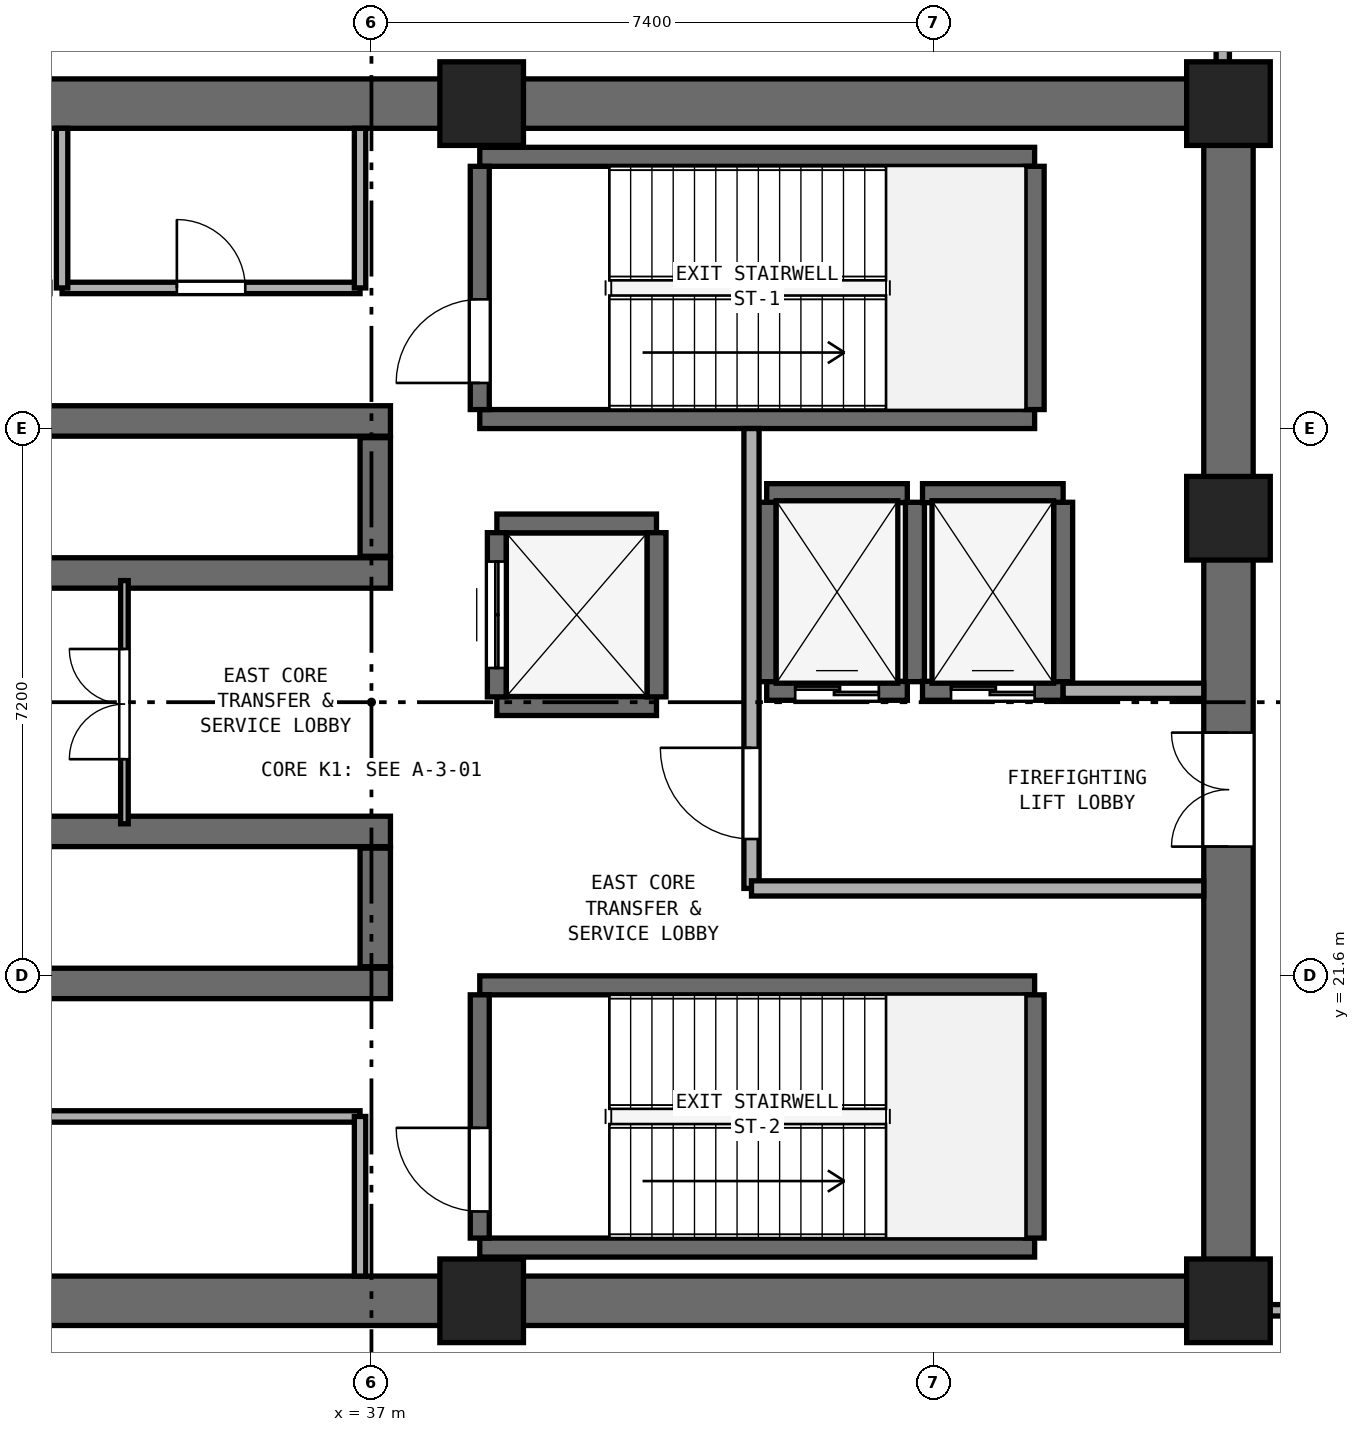
"""IFC4 building model, lengths in metres.
Left out: names, types, materials, properties, quantities, classifications, styles, units other than length and angle.
Written with IfcOpenShell. Run it as: python <this file> out.ifc"""

import sys

from ifc_helpers import new_model, si_unit, direction, frame, frame_2d, origin, origin_2d, place, context, subcontext, project, spatial, rectangle, extrude, element, fill, save


model = new_model("IFC4")
c1 = context("Model", 3, precision=1e-05, world=origin(), true_north=direction((0.0, 1.0)))
c2 = subcontext(c1, "Body", "Model", "MODEL_VIEW")
j1 = project(units=[si_unit("LENGTHUNIT", "METRE"), si_unit("PLANEANGLEUNIT", "RADIAN")], contexts=[c1])
p1 = place(None, origin())
s1 = spatial("IfcSite", under=j1, at=p1, CompositionType="ELEMENT")
p2 = place(p1, origin())
s2 = spatial("IfcBuilding", under=s1, at=p2, CompositionType="ELEMENT")
p3 = place(p2, frame((0.0, 0.0, -4.8)))
s3 = spatial("IfcBuildingStorey", under=s2, at=p3, CompositionType="ELEMENT", Elevation=-4.8)
for number, where, z_axis, x_axis in (
    (1, (25.4, 17.325, 0.0), (0.0, 0.0, 1.0), (1.0, 0.0, 0.0)),
    (2, (25.4, 33.075, 0.0), (0.0, 0.0, 1.0), (1.0, 0.0, 0.0)),
):
    element("IfcWall", number, at=place(p3, frame(where, z_axis=z_axis, x_axis=x_axis)), inside=s3, PredefinedType="SHEAR", context=c2, shape_type="SweptSolid", body=[
        extrude(rectangle(XDim=23.2, YDim=0.65, at=frame_2d((11.6, 0.0))), origin(), (0.0, 0.0, 1.0), 4.45),
    ])
p4 = place(p3, frame((48.275, 17.65, 0.0), z_axis=(0.0, 0.0, 1.0), x_axis=(0.0, 1.0, 0.0)))
e3 = element("IfcWall", 3, at=p4, inside=s3, PredefinedType="SHEAR", context=c2, shape_type="SweptSolid", body=[
    extrude(rectangle(XDim=15.1, YDim=0.65, at=frame_2d((7.55, 0.0))), origin(), (0.0, 0.0, 1.0), 4.45),
])
p5 = place(p4, frame((5.65, 0.0, 0.0)))
e4 = element("IfcOpeningElement", 4, at=p5, cuts=e3, PredefinedType="OPENING", context=c2, shape_type="SweptSolid", body=[
    extrude(rectangle(XDim=1.5, YDim=2.15, at=frame_2d((0.75, 1.075))), frame((0.0, 0.335, 0.0), z_axis=(0.0, -1.0, 0.0), x_axis=(1.0, 0.0, 0.0)), (0.0, 0.0, 1.0), 0.67),
])
for number, where, z_axis, x_axis in (
    (5, (38.45, 17.325, 0.0), (0.0, 0.0, 1.0), (1.0, 0.0, 0.0)),
    (6, (48.275, 17.325, 0.0), (0.0, 0.0, 1.0), (1.0, 0.0, 0.0)),
    (7, (48.275, 27.62, 0.0), (0.0, 0.0, 1.0), (1.0, 0.0, 0.0)),
    (8, (48.275, 33.075, 0.0), (0.0, 0.0, 1.0), (1.0, 0.0, 0.0)),
    (9, (38.45, 33.075, 0.0), (0.0, 0.0, 1.0), (1.0, 0.0, 0.0)),
):
    element("IfcColumn", number, at=place(p3, frame(where, z_axis=z_axis, x_axis=x_axis)), inside=s3, PredefinedType="PILASTER", context=c2, shape_type="SweptSolid", body=[
        extrude(rectangle(XDim=1.1, YDim=1.1, at=origin_2d()), origin(), (0.0, 0.0, 1.0), 4.8),
    ])
for number, where, z_axis, x_axis in (
    (10, (29.85, 21.5, 0.0), (0.0, 0.0, 1.0), (1.0, 0.0, 0.0)),
    (11, (29.85, 23.5, 0.0), (0.0, 0.0, 1.0), (1.0, 0.0, 0.0)),
):
    element("IfcWall", number, at=place(p3, frame(where, z_axis=z_axis, x_axis=x_axis)), inside=s3, PredefinedType="SOLIDWALL", context=c2, shape_type="SweptSolid", body=[
        extrude(rectangle(XDim=7.4, YDim=0.4, at=frame_2d((3.7, 0.0))), origin(), (0.0, 0.0, 1.0), 4.4),
    ])
p6 = place(p3, frame((37.05, 21.72, 0.0), z_axis=(0.0, 0.0, 1.0), x_axis=(0.0, 1.0, 0.0)))
e12 = element("IfcWall", 12, at=p6, inside=s3, PredefinedType="SOLIDWALL", context=c2, shape_type="SweptSolid", body=[
    extrude(rectangle(XDim=1.56, YDim=0.4, at=frame_2d((0.78, 0.0))), origin(), (0.0, 0.0, 1.0), 4.4),
])
for number, where, z_axis, x_axis in (
    (13, (29.85, 26.9, 0.0), (0.0, 0.0, 1.0), (1.0, 0.0, 0.0)),
    (14, (29.85, 28.9, 0.0), (0.0, 0.0, 1.0), (1.0, 0.0, 0.0)),
):
    element("IfcWall", number, at=place(p3, frame(where, z_axis=z_axis, x_axis=x_axis)), inside=s3, PredefinedType="SOLIDWALL", context=c2, shape_type="SweptSolid", body=[
        extrude(rectangle(XDim=7.4, YDim=0.4, at=frame_2d((3.7, 0.0))), origin(), (0.0, 0.0, 1.0), 4.4),
    ])
p7 = place(p3, frame((37.05, 27.12, 0.0), z_axis=(0.0, 0.0, 1.0), x_axis=(0.0, 1.0, 0.0)))
e15 = element("IfcWall", 15, at=p7, inside=s3, PredefinedType="SOLIDWALL", context=c2, shape_type="SweptSolid", body=[
    extrude(rectangle(XDim=1.56, YDim=0.4, at=frame_2d((0.78, 0.0))), origin(), (0.0, 0.0, 1.0), 4.4),
])
for number, where, z_axis, x_axis in (
    (16, (38.425, 28.925, 0.0), (0.0, 0.0, 1.0), (1.0, 0.0, 0.0)),
    (17, (38.425, 32.375, 0.0), (0.0, 0.0, 1.0), (1.0, 0.0, 0.0)),
):
    element("IfcWall", number, at=place(p3, frame(where, z_axis=z_axis, x_axis=x_axis)), inside=s3, PredefinedType="SHEAR", context=c2, shape_type="SweptSolid", body=[
        extrude(rectangle(XDim=7.3, YDim=0.25, at=frame_2d((3.65, 0.0))), origin(), (0.0, 0.0, 1.0), 4.45),
    ])
p8 = place(p3, frame((38.425, 29.05, 0.0), z_axis=(0.0, 0.0, 1.0), x_axis=(0.0, 1.0, 0.0)))
e18 = element("IfcWall", 18, at=p8, inside=s3, PredefinedType="SHEAR", context=c2, shape_type="SweptSolid", body=[
    extrude(rectangle(XDim=3.2, YDim=0.25, at=frame_2d((1.6, 0.0))), origin(), (0.0, 0.0, 1.0), 4.45),
])
p9 = place(p8, frame((0.35, 0.0, 0.0)))
e19 = element("IfcOpeningElement", 19, at=p9, cuts=e18, PredefinedType="OPENING", context=c2, shape_type="SweptSolid", body=[
    extrude(rectangle(XDim=1.1, YDim=2.15, at=frame_2d((0.55, 1.075))), frame((0.0, 0.135, 0.0), z_axis=(0.0, -1.0, 0.0), x_axis=(1.0, 0.0, 0.0)), (0.0, 0.0, 1.0), 0.27),
])
p10 = place(p3, frame((45.725, 29.05, 0.0), z_axis=(0.0, 0.0, 1.0), x_axis=(0.0, 1.0, 0.0)))
e20 = element("IfcWall", 20, at=p10, inside=s3, PredefinedType="SHEAR", context=c2, shape_type="SweptSolid", body=[
    extrude(rectangle(XDim=3.2, YDim=0.25, at=frame_2d((1.6, 0.0))), origin(), (0.0, 0.0, 1.0), 4.45),
])
for number, where, z_axis, x_axis in (
    (21, (38.425, 18.025, 0.0), (0.0, 0.0, 1.0), (1.0, 0.0, 0.0)),
    (22, (38.425, 21.475, 0.0), (0.0, 0.0, 1.0), (1.0, 0.0, 0.0)),
):
    element("IfcWall", number, at=place(p3, frame(where, z_axis=z_axis, x_axis=x_axis)), inside=s3, PredefinedType="SHEAR", context=c2, shape_type="SweptSolid", body=[
        extrude(rectangle(XDim=7.3, YDim=0.25, at=frame_2d((3.65, 0.0))), origin(), (0.0, 0.0, 1.0), 4.45),
    ])
p11 = place(p3, frame((38.425, 18.15, 0.0), z_axis=(0.0, 0.0, 1.0), x_axis=(0.0, 1.0, 0.0)))
e23 = element("IfcWall", 23, at=p11, inside=s3, PredefinedType="SHEAR", context=c2, shape_type="SweptSolid", body=[
    extrude(rectangle(XDim=3.2, YDim=0.25, at=frame_2d((1.6, 0.0))), origin(), (0.0, 0.0, 1.0), 4.45),
])
p12 = place(p11, frame((0.35, 0.0, 0.0)))
e24 = element("IfcOpeningElement", 24, at=p12, cuts=e23, PredefinedType="OPENING", context=c2, shape_type="SweptSolid", body=[
    extrude(rectangle(XDim=1.1, YDim=2.15, at=frame_2d((0.55, 1.075))), frame((0.0, 0.135, 0.0), z_axis=(0.0, -1.0, 0.0), x_axis=(1.0, 0.0, 0.0)), (0.0, 0.0, 1.0), 0.27),
])
p13 = place(p3, frame((45.725, 18.15, 0.0), z_axis=(0.0, 0.0, 1.0), x_axis=(0.0, 1.0, 0.0)))
e25 = element("IfcWall", 25, at=p13, inside=s3, PredefinedType="SHEAR", context=c2, shape_type="SweptSolid", body=[
    extrude(rectangle(XDim=3.2, YDim=0.25, at=frame_2d((1.6, 0.0))), origin(), (0.0, 0.0, 1.0), 4.45),
])
p14 = place(p3, frame((42.2, 25.35, 0.0), z_axis=(0.0, 0.0, 1.0), x_axis=(1.0, 0.0, 0.0)))
e26 = element("IfcWall", 26, at=p14, inside=s3, PredefinedType="SHEAR", context=c2, shape_type="SweptSolid", body=[
    extrude(rectangle(XDim=1.85, YDim=0.25, at=frame_2d((0.925, 0.0))), origin(), (0.0, 0.0, 1.0), 4.45),
])
p15 = place(p14, frame((0.375, 0.0, 0.0)))
e27 = element("IfcOpeningElement", 27, at=p15, cuts=e26, PredefinedType="OPENING", context=c2, shape_type="SweptSolid", body=[
    extrude(rectangle(XDim=1.1, YDim=2.15, at=frame_2d((0.55, 1.075))), frame((0.0, 0.135, 0.0), z_axis=(0.0, -1.0, 0.0), x_axis=(1.0, 0.0, 0.0)), (0.0, 0.0, 1.0), 0.27),
])
p16 = place(p3, frame((42.2, 27.95, 0.0), z_axis=(0.0, 0.0, 1.0), x_axis=(1.0, 0.0, 0.0)))
e28 = element("IfcWall", 28, at=p16, inside=s3, PredefinedType="SHEAR", context=c2, shape_type="SweptSolid", body=[
    extrude(rectangle(XDim=1.85, YDim=0.25, at=frame_2d((0.925, 0.0))), origin(), (0.0, 0.0, 1.0), 4.45),
])
for number, where, z_axis, x_axis in (
    (29, (42.2, 25.47, 0.0), (0.0, 0.0, 1.0), (0.0, 1.0, 0.0)),
    (30, (44.15, 25.47, 0.0), (0.0, 0.0, 1.0), (0.0, 1.0, 0.0)),
):
    element("IfcWall", number, at=place(p3, frame(where, z_axis=z_axis, x_axis=x_axis)), inside=s3, PredefinedType="SHEAR", context=c2, shape_type="SweptSolid", body=[
        extrude(rectangle(XDim=2.36, YDim=0.25, at=frame_2d((1.18, 0.0))), origin(), (0.0, 0.0, 1.0), 4.45),
    ])
p17 = place(p3, frame((44.25, 25.35, 0.0), z_axis=(0.0, 0.0, 1.0), x_axis=(1.0, 0.0, 0.0)))
e31 = element("IfcWall", 31, at=p17, inside=s3, PredefinedType="SHEAR", context=c2, shape_type="SweptSolid", body=[
    extrude(rectangle(XDim=1.85, YDim=0.25, at=frame_2d((0.925, 0.0))), origin(), (0.0, 0.0, 1.0), 4.45),
])
p18 = place(p17, frame((0.375, 0.0, 0.0)))
e32 = element("IfcOpeningElement", 32, at=p18, cuts=e31, PredefinedType="OPENING", context=c2, shape_type="SweptSolid", body=[
    extrude(rectangle(XDim=1.1, YDim=2.15, at=frame_2d((0.55, 1.075))), frame((0.0, 0.135, 0.0), z_axis=(0.0, -1.0, 0.0), x_axis=(1.0, 0.0, 0.0)), (0.0, 0.0, 1.0), 0.27),
])
p19 = place(p3, frame((44.25, 27.95, 0.0), z_axis=(0.0, 0.0, 1.0), x_axis=(1.0, 0.0, 0.0)))
e33 = element("IfcWall", 33, at=p19, inside=s3, PredefinedType="SHEAR", context=c2, shape_type="SweptSolid", body=[
    extrude(rectangle(XDim=1.85, YDim=0.25, at=frame_2d((0.925, 0.0))), origin(), (0.0, 0.0, 1.0), 4.45),
])
p20 = place(p3, frame((46.1, 25.47, 0.0), z_axis=(0.0, 0.0, 1.0), x_axis=(0.0, 1.0, 0.0)))
e34 = element("IfcWall", 34, at=p20, inside=s3, PredefinedType="SHEAR", context=c2, shape_type="SweptSolid", body=[
    extrude(rectangle(XDim=2.36, YDim=0.25, at=frame_2d((1.18, 0.0))), origin(), (0.0, 0.0, 1.0), 4.45),
])
for number, where, z_axis, x_axis in (
    (35, (38.65, 25.15, 0.0), (0.0, 0.0, 1.0), (1.0, 0.0, 0.0)),
    (36, (38.65, 27.55, 0.0), (0.0, 0.0, 1.0), (1.0, 0.0, 0.0)),
):
    element("IfcWall", number, at=place(p3, frame(where, z_axis=z_axis, x_axis=x_axis)), inside=s3, PredefinedType="SHEAR", context=c2, shape_type="SweptSolid", body=[
        extrude(rectangle(XDim=2.1, YDim=0.25, at=frame_2d((1.05, 0.0))), origin(), (0.0, 0.0, 1.0), 4.45),
    ])
p21 = place(p3, frame((38.65, 25.27, 0.0), z_axis=(0.0, 0.0, 1.0), x_axis=(0.0, 1.0, 0.0)))
e37 = element("IfcWall", 37, at=p21, inside=s3, PredefinedType="SHEAR", context=c2, shape_type="SweptSolid", body=[
    extrude(rectangle(XDim=2.16, YDim=0.25, at=frame_2d((1.08, 0.0))), origin(), (0.0, 0.0, 1.0), 4.45),
])
p22 = place(p21, frame((0.38, 0.0, 0.0)))
e38 = element("IfcOpeningElement", 38, at=p22, cuts=e37, PredefinedType="OPENING", context=c2, shape_type="SweptSolid", body=[
    extrude(rectangle(XDim=1.4, YDim=2.2, at=frame_2d((0.7, 1.1))), frame((0.0, 0.135, 0.0), z_axis=(0.0, -1.0, 0.0), x_axis=(1.0, 0.0, 0.0)), (0.0, 0.0, 1.0), 0.27),
])
p23 = place(p3, frame((40.75, 25.27, 0.0), z_axis=(0.0, 0.0, 1.0), x_axis=(0.0, 1.0, 0.0)))
e39 = element("IfcWall", 39, at=p23, inside=s3, PredefinedType="SHEAR", context=c2, shape_type="SweptSolid", body=[
    extrude(rectangle(XDim=2.16, YDim=0.25, at=frame_2d((1.08, 0.0))), origin(), (0.0, 0.0, 1.0), 4.45),
])
p24 = place(p3, frame((42.0, 22.75, 0.0), z_axis=(0.0, 0.0, 1.0), x_axis=(0.0, 1.0, 0.0)))
e40 = element("IfcWall", 40, at=p24, inside=s3, PredefinedType="SOLIDWALL", context=c2, shape_type="SweptSolid", body=[
    extrude(rectangle(XDim=6.05, YDim=0.2, at=frame_2d((3.025, 0.0))), origin(), (0.0, 0.0, 1.0), 4.45),
])
p25 = place(p24, frame((0.65, 0.0, 0.0)))
e41 = element("IfcOpeningElement", 41, at=p25, cuts=e40, PredefinedType="OPENING", context=c2, shape_type="SweptSolid", body=[
    extrude(rectangle(XDim=1.2, YDim=2.15, at=frame_2d((0.6, 1.075))), frame((0.0, 0.11, 0.0), z_axis=(0.0, -1.0, 0.0), x_axis=(1.0, 0.0, 0.0)), (0.0, 0.0, 1.0), 0.22),
])
p26 = place(p3, frame((42.0, 22.75, 0.0), z_axis=(0.0, 0.0, 1.0), x_axis=(1.0, 0.0, 0.0)))
e42 = element("IfcWall", 42, at=p26, inside=s3, PredefinedType="SOLIDWALL", context=c2, shape_type="SweptSolid", body=[
    extrude(rectangle(XDim=5.95, YDim=0.2, at=frame_2d((2.975, 0.0))), origin(), (0.0, 0.0, 1.0), 4.45),
])
p27 = place(p3, frame((46.1, 25.35, 0.0), z_axis=(0.0, 0.0, 1.0), x_axis=(1.0, 0.0, 0.0)))
e43 = element("IfcWall", 43, at=p27, inside=s3, PredefinedType="SOLIDWALL", context=c2, shape_type="SweptSolid", body=[
    extrude(rectangle(XDim=1.85, YDim=0.2, at=frame_2d((0.925, 0.0))), origin(), (0.0, 0.0, 1.0), 4.45),
])
p28 = place(p3, frame((32.93, 30.65, 0.0), z_axis=(0.0, 0.0, 1.0), x_axis=(1.0, 0.0, 0.0)))
e44 = element("IfcWall", 44, at=p28, inside=s3, PredefinedType="PARTITIONING", context=c2, shape_type="SweptSolid", body=[
    extrude(rectangle(XDim=3.92, YDim=0.15, at=frame_2d((1.96, 0.0))), origin(), (0.0, 0.0, 1.0), 4.45),
])
p29 = place(p28, frame((1.51, 0.0, 0.0)))
e45 = element("IfcOpeningElement", 45, at=p29, cuts=e44, PredefinedType="OPENING", context=c2, shape_type="SweptSolid", body=[
    extrude(rectangle(XDim=0.9, YDim=2.1, at=frame_2d((0.45, 1.05))), frame((0.0, 0.085, 0.0), z_axis=(0.0, -1.0, 0.0), x_axis=(1.0, 0.0, 0.0)), (0.0, 0.0, 1.0), 0.17),
])
for number, where, z_axis, x_axis in (
    (46, (32.93, 30.65, 0.0), (0.0, 0.0, 1.0), (0.0, 1.0, 0.0)),
    (47, (36.85, 30.65, 0.0), (0.0, 0.0, 1.0), (0.0, 1.0, 0.0)),
):
    element("IfcWall", number, at=place(p3, frame(where, z_axis=z_axis, x_axis=x_axis)), inside=s3, PredefinedType="PARTITIONING", context=c2, shape_type="SweptSolid", body=[
        extrude(rectangle(XDim=2.1, YDim=0.15, at=frame_2d((1.05, 0.0))), origin(), (0.0, 0.0, 1.0), 4.45),
    ])
p30 = place(p3, frame((26.17, 19.75, 0.0), z_axis=(0.0, 0.0, 1.0), x_axis=(1.0, 0.0, 0.0)))
e48 = element("IfcWall", 48, at=p30, inside=s3, PredefinedType="PARTITIONING", context=c2, shape_type="SweptSolid", body=[
    extrude(rectangle(XDim=10.68, YDim=0.15, at=frame_2d((5.34, 0.0))), origin(), (0.0, 0.0, 1.0), 4.45),
])
p31 = place(p30, frame((4.865, 0.0, 0.0)))
e49 = element("IfcOpeningElement", 49, at=p31, cuts=e48, PredefinedType="OPENING", context=c2, shape_type="SweptSolid", body=[
    extrude(rectangle(XDim=0.95, YDim=2.1, at=frame_2d((0.475, 1.05))), frame((0.0, 0.085, 0.0), z_axis=(0.0, -1.0, 0.0), x_axis=(1.0, 0.0, 0.0)), (0.0, 0.0, 1.0), 0.17),
])
p32 = place(p3, frame((36.85, 17.65, 0.0), z_axis=(0.0, 0.0, 1.0), x_axis=(0.0, 1.0, 0.0)))
e50 = element("IfcWall", 50, at=p32, inside=s3, PredefinedType="PARTITIONING", context=c2, shape_type="SweptSolid", body=[
    extrude(rectangle(XDim=2.1, YDim=0.15, at=frame_2d((1.05, 0.0))), origin(), (0.0, 0.0, 1.0), 4.45),
])
p33 = place(p3, frame((33.75, 23.6, 0.0), z_axis=(0.0, 0.0, 1.0), x_axis=(0.0, 1.0, 0.0)))
e51 = element("IfcWall", 51, at=p33, inside=s3, PredefinedType="PARTITIONING", context=c2, shape_type="SweptSolid", body=[
    extrude(rectangle(XDim=3.2, YDim=0.1, at=frame_2d((1.6, 0.0))), origin(), (0.0, 0.0, 1.0), 4.45),
])
p34 = place(p33, frame((0.85, 0.0, 0.0)))
e52 = element("IfcOpeningElement", 52, at=p34, cuts=e51, PredefinedType="OPENING", context=c2, shape_type="SweptSolid", body=[
    extrude(rectangle(XDim=1.45, YDim=2.12, at=frame_2d((0.725, 1.06))), frame((0.0, 0.06, 0.0), z_axis=(0.0, -1.0, 0.0), x_axis=(1.0, 0.0, 0.0)), (0.0, 0.0, 1.0), 0.12),
])
p35 = place(p3, frame((48.2, 33.54, 0.0), z_axis=(0.0, 0.0, 1.0), x_axis=(0.0, 1.0, 0.0)))
e53 = element("IfcWall", 53, at=p35, inside=s3, PredefinedType="PARTITIONING", context=c2, shape_type="SweptSolid", body=[
    extrude(rectangle(XDim=3.96, YDim=0.175, at=frame_2d((1.98, 0.0))), origin(), (0.0, 0.0, 1.0), 4.45),
])
p36 = place(p3, frame((48.74, 17.2, 0.0), z_axis=(0.0, 0.0, 1.0), x_axis=(1.0, 0.0, 0.0)))
e54 = element("IfcWall", 54, at=p36, inside=s3, PredefinedType="PARTITIONING", context=c2, shape_type="SweptSolid", body=[
    extrude(rectangle(XDim=2.3, YDim=0.15, at=frame_2d((1.15, 0.0))), origin(), (0.0, 0.0, 1.0), 4.45),
])
p37 = place(p9, origin())
e55 = element("IfcDoor", 55, at=p37, inside=s3, OperationType="SINGLE_SWING_LEFT", PredefinedType="DOOR", context=c2, shape_type="SweptSolid", body=[
    extrude(rectangle(XDim=1.1, YDim=2.15, at=frame_2d((0.55, 1.075))), frame((0.0, 0.025, 0.0), z_axis=(0.0, -1.0, 0.0), x_axis=(1.0, 0.0, 0.0)), (0.0, 0.0, 1.0), 0.05),
])
fill(e19, e55)
p38 = place(p12, origin())
e56 = element("IfcDoor", 56, at=p38, inside=s3, OperationType="SINGLE_SWING_RIGHT", PredefinedType="DOOR", context=c2, shape_type="SweptSolid", body=[
    extrude(rectangle(XDim=1.1, YDim=2.15, at=frame_2d((0.55, 1.075))), frame((0.0, 0.025, 0.0), z_axis=(0.0, -1.0, 0.0), x_axis=(1.0, 0.0, 0.0)), (0.0, 0.0, 1.0), 0.05),
])
fill(e24, e56)
p39 = place(p15, origin())
e57 = element("IfcDoor", 57, at=p39, inside=s3, OperationType="DOUBLE_DOOR_SLIDING", PredefinedType="DOOR", context=c2, shape_type="SweptSolid", body=[
    extrude(rectangle(XDim=1.1, YDim=2.15, at=frame_2d((0.55, 1.075))), frame((0.0, 0.025, 0.0), z_axis=(0.0, -1.0, 0.0), x_axis=(1.0, 0.0, 0.0)), (0.0, 0.0, 1.0), 0.05),
])
fill(e27, e57)
p40 = place(p18, origin())
e58 = element("IfcDoor", 58, at=p40, inside=s3, OperationType="DOUBLE_DOOR_SLIDING", PredefinedType="DOOR", context=c2, shape_type="SweptSolid", body=[
    extrude(rectangle(XDim=1.1, YDim=2.15, at=frame_2d((0.55, 1.075))), frame((0.0, 0.025, 0.0), z_axis=(0.0, -1.0, 0.0), x_axis=(1.0, 0.0, 0.0)), (0.0, 0.0, 1.0), 0.05),
])
fill(e32, e58)
p41 = place(p22, origin())
e59 = element("IfcDoor", 59, at=p41, inside=s3, OperationType="DOUBLE_DOOR_SLIDING", PredefinedType="DOOR", context=c2, shape_type="SweptSolid", body=[
    extrude(rectangle(XDim=1.4, YDim=2.2, at=frame_2d((0.7, 1.1))), frame((0.0, 0.025, 0.0), z_axis=(0.0, -1.0, 0.0), x_axis=(1.0, 0.0, 0.0)), (0.0, 0.0, 1.0), 0.05),
])
fill(e38, e59)
p42 = place(p25, origin())
e60 = element("IfcDoor", 60, at=p42, inside=s3, OperationType="SINGLE_SWING_RIGHT", PredefinedType="DOOR", context=c2, shape_type="SweptSolid", body=[
    extrude(rectangle(XDim=1.2, YDim=2.15, at=frame_2d((0.6, 1.075))), frame((0.0, 0.025, 0.0), z_axis=(0.0, -1.0, 0.0), x_axis=(1.0, 0.0, 0.0)), (0.0, 0.0, 1.0), 0.05),
])
fill(e41, e60)
p43 = place(p5, origin())
e61 = element("IfcDoor", 61, at=p43, inside=s3, OperationType="DOUBLE_DOOR_SINGLE_SWING", PredefinedType="DOOR", context=c2, shape_type="SweptSolid", body=[
    extrude(rectangle(XDim=1.5, YDim=2.15, at=frame_2d((0.75, 1.075))), frame((0.0, 0.025, 0.0), z_axis=(0.0, -1.0, 0.0), x_axis=(1.0, 0.0, 0.0)), (0.0, 0.0, 1.0), 0.05),
])
fill(e4, e61)
p44 = place(p29, origin())
e62 = element("IfcDoor", 62, at=p44, inside=s3, OperationType="SINGLE_SWING_LEFT", PredefinedType="DOOR", context=c2, shape_type="SweptSolid", body=[
    extrude(rectangle(XDim=0.9, YDim=2.1, at=frame_2d((0.45, 1.05))), frame((0.0, 0.025, 0.0), z_axis=(0.0, -1.0, 0.0), x_axis=(1.0, 0.0, 0.0)), (0.0, 0.0, 1.0), 0.05),
])
fill(e45, e62)
p45 = place(p34, origin())
e63 = element("IfcDoor", 63, at=p45, inside=s3, OperationType="DOUBLE_DOOR_SINGLE_SWING", PredefinedType="DOOR", context=c2, shape_type="SweptSolid", body=[
    extrude(rectangle(XDim=1.45, YDim=2.12, at=frame_2d((0.725, 1.06))), frame((0.0, 0.025, 0.0), z_axis=(0.0, -1.0, 0.0), x_axis=(1.0, 0.0, 0.0)), (0.0, 0.0, 1.0), 0.05),
])
fill(e52, e63)
save(model, sys.argv[1])
